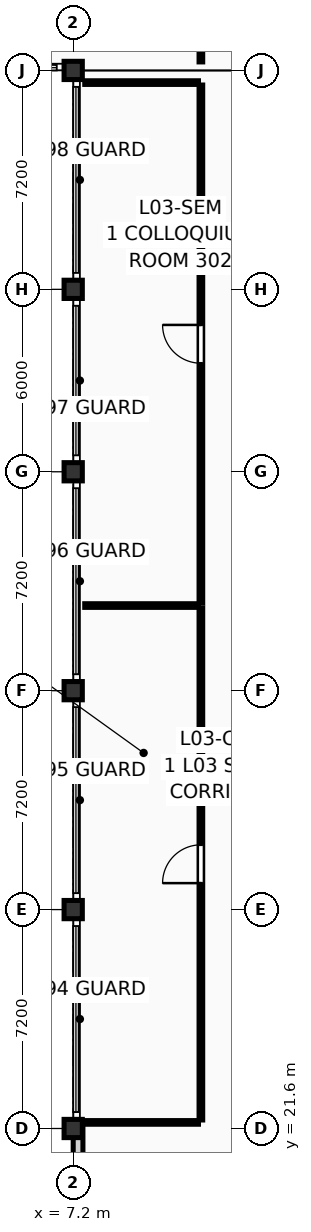
"""IFC4 building model, lengths in metres.
Left out: names, types, materials, properties, quantities, classifications, styles, units other than length and angle.
Written with IfcOpenShell. Run it as: python <this file> out.ifc"""

import sys

from ifc_helpers import new_model, si_unit, direction, frame, frame_2d, origin, origin_2d, place, context, subcontext, project, spatial, rectangle, extrude, element, fill, save


model = new_model("IFC4")
c1 = context("Model", 3, precision=1e-05, world=origin(), true_north=direction((0.0, 1.0)))
c2 = subcontext(c1, "Body", "Model", "MODEL_VIEW")
j1 = project(units=[si_unit("LENGTHUNIT", "METRE"), si_unit("PLANEANGLEUNIT", "RADIAN")], contexts=[c1])
p1 = place(None, origin())
s1 = spatial("IfcSite", under=j1, at=p1, CompositionType="ELEMENT")
p2 = place(p1, origin())
s2 = spatial("IfcBuilding", under=s1, at=p2, CompositionType="ELEMENT")
p3 = place(p2, frame((0.0, 0.0, 12.15)))
s3 = spatial("IfcBuildingStorey", under=s2, at=p3, CompositionType="ELEMENT", Elevation=12.15)
for number, where, z_axis, x_axis in (
    (1, (7.2, 21.6, 0.0), (0.0, 0.0, 1.0), (1.0, 0.0, 0.0)),
    (2, (7.2, 28.8, 0.0), (0.0, 0.0, 1.0), (1.0, 0.0, 0.0)),
    (3, (7.2, 36.0, 0.0), (0.0, 0.0, 1.0), (1.0, 0.0, 0.0)),
    (4, (7.2, 43.2, 0.0), (0.0, 0.0, 1.0), (1.0, 0.0, 0.0)),
    (5, (7.2, 49.2, 0.0), (0.0, 0.0, 1.0), (1.0, 0.0, 0.0)),
    (6, (7.2, 56.4, 0.0), (0.0, 0.0, 1.0), (1.0, 0.0, 0.0)),
):
    element("IfcColumn", number, at=place(p3, frame(where, z_axis=z_axis, x_axis=x_axis)), inside=s3, PredefinedType="COLUMN", context=c2, shape_type="SweptSolid", body=[
        extrude(rectangle(XDim=0.6, YDim=0.6, at=origin_2d()), origin(), (0.0, 0.0, 1.0), 3.6),
    ])
p4 = place(p3, frame((7.36, 14.4, 0.0), z_axis=(0.0, 0.0, 1.0), x_axis=(0.0, 1.0, 0.0)))
e7 = element("IfcWall", 7, at=p4, inside=s3, PredefinedType="SOLIDWALL", context=c2, shape_type="SweptSolid", body=[
    extrude(rectangle(XDim=7.2, YDim=0.32, at=frame_2d((3.6, 0.0))), origin(), (0.0, 0.0, 1.0), 2.84),
])
p5 = place(p4, frame((1.113, 0.0, 0.18)))
e8 = element("IfcOpeningElement", 8, at=p5, cuts=e7, PredefinedType="OPENING", context=c2, shape_type="SweptSolid", body=[
    extrude(rectangle(XDim=1.35, YDim=2.45, at=frame_2d((0.675, 1.225))), frame((0.0, 0.172, 0.0), z_axis=(0.0, -1.0, 0.0), x_axis=(1.0, 0.0, 0.0)), (0.0, 0.0, 1.0), 0.344),
])
p6 = place(p4, frame((2.925, 0.0, 0.18)))
e9 = element("IfcOpeningElement", 9, at=p6, cuts=e7, PredefinedType="OPENING", context=c2, shape_type="SweptSolid", body=[
    extrude(rectangle(XDim=1.35, YDim=2.45, at=frame_2d((0.675, 1.225))), frame((0.0, 0.172, 0.0), z_axis=(0.0, -1.0, 0.0), x_axis=(1.0, 0.0, 0.0)), (0.0, 0.0, 1.0), 0.344),
])
p7 = place(p4, frame((4.738, 0.0, 0.18)))
e10 = element("IfcOpeningElement", 10, at=p7, cuts=e7, PredefinedType="OPENING", context=c2, shape_type="SweptSolid", body=[
    extrude(rectangle(XDim=1.35, YDim=2.45, at=frame_2d((0.675, 1.225))), frame((0.0, 0.172, 0.0), z_axis=(0.0, -1.0, 0.0), x_axis=(1.0, 0.0, 0.0)), (0.0, 0.0, 1.0), 0.344),
])
p8 = place(p3, frame((7.58, 21.8, 0.0), z_axis=(0.0, 0.0, 1.0), x_axis=(1.0, 0.0, 0.0)))
e11 = element("IfcWall", 11, at=p8, inside=s3, PredefinedType="PARTITIONING", context=c2, shape_type="SweptSolid", body=[
    extrude(rectangle(XDim=3.74, YDim=0.12, at=frame_2d((1.87, 0.0))), origin(), (0.0, 0.0, 1.0), 2.691),
])
p9 = place(p3, frame((11.4, 21.88, 0.0), z_axis=(0.0, 0.0, 1.0), x_axis=(0.0, 1.0, 0.0)))
e12 = element("IfcWall", 12, at=p9, inside=s3, PredefinedType="PARTITIONING", context=c2, shape_type="SweptSolid", body=[
    extrude(rectangle(XDim=16.84, YDim=0.12, at=frame_2d((8.42, 0.0))), origin(), (0.0, 0.0, 1.0), 3.375),
])
p10 = place(p9, frame((7.79, 0.0, 0.0)))
e13 = element("IfcOpeningElement", 13, at=p10, cuts=e12, PredefinedType="OPENING", context=c2, shape_type="SweptSolid", body=[
    extrude(rectangle(XDim=1.26, YDim=2.18, at=frame_2d((0.63, 1.09))), frame((0.0, 0.072, 0.0), z_axis=(0.0, -1.0, 0.0), x_axis=(1.0, 0.0, 0.0)), (0.0, 0.0, 1.0), 0.144),
])
p11 = place(p3, frame((7.58, 38.8, 0.0), z_axis=(0.0, 0.0, 1.0), x_axis=(1.0, 0.0, 0.0)))
e14 = element("IfcWall", 14, at=p11, inside=s3, PredefinedType="PARTITIONING", context=c2, shape_type="SweptSolid", body=[
    extrude(rectangle(XDim=3.74, YDim=0.12, at=frame_2d((1.87, 0.0))), origin(), (0.0, 0.0, 1.0), 3.375),
])
p12 = place(p3, frame((11.4, 38.88, 0.0), z_axis=(0.0, 0.0, 1.0), x_axis=(0.0, 1.0, 0.0)))
e15 = element("IfcWall", 15, at=p12, inside=s3, PredefinedType="PARTITIONING", context=c2, shape_type="SweptSolid", body=[
    extrude(rectangle(XDim=17.04, YDim=0.12, at=frame_2d((8.52, 0.0))), origin(), (0.0, 0.0, 1.0), 3.375),
])
p13 = place(p12, frame((7.89, 0.0, 0.0)))
e16 = element("IfcOpeningElement", 16, at=p13, cuts=e15, PredefinedType="OPENING", context=c2, shape_type="SweptSolid", body=[
    extrude(rectangle(XDim=1.26, YDim=2.18, at=frame_2d((0.63, 1.09))), frame((0.0, 0.072, 0.0), z_axis=(0.0, -1.0, 0.0), x_axis=(1.0, 0.0, 0.0)), (0.0, 0.0, 1.0), 0.144),
])
p14 = place(p3, frame((7.58, 56.0, 0.0), z_axis=(0.0, 0.0, 1.0), x_axis=(1.0, 0.0, 0.0)))
e17 = element("IfcWall", 17, at=p14, inside=s3, PredefinedType="PARTITIONING", context=c2, shape_type="SweptSolid", body=[
    extrude(rectangle(XDim=3.74, YDim=0.12, at=frame_2d((1.87, 0.0))), origin(), (0.0, 0.0, 1.0), 3.375),
])
p15 = place(p3, frame((11.4, 56.68, 0.0), z_axis=(0.0, 0.0, 1.0), x_axis=(0.0, 1.0, 0.0)))
e18 = element("IfcWall", 18, at=p15, inside=s3, PredefinedType="PARTITIONING", context=c2, shape_type="SweptSolid", body=[
    extrude(rectangle(XDim=27.24, YDim=0.12, at=frame_2d((13.62, 0.0))), origin(), (0.0, 0.0, 1.0), 3.375),
])
p16 = place(p15, frame((12.77, 0.0, 0.0)))
e19 = element("IfcOpeningElement", 19, at=p16, cuts=e18, PredefinedType="OPENING", context=c2, shape_type="SweptSolid", body=[
    extrude(rectangle(XDim=1.7, YDim=2.28, at=frame_2d((0.85, 1.14))), frame((0.0, 0.072, 0.0), z_axis=(0.0, -1.0, 0.0), x_axis=(1.0, 0.0, 0.0)), (0.0, 0.0, 1.0), 0.144),
])
p17 = place(p10, origin())
e20 = element("IfcDoor", 20, at=p17, inside=s3, OperationType="SINGLE_SWING_LEFT", PredefinedType="DOOR", context=c2, shape_type="SweptSolid", body=[
    extrude(rectangle(XDim=1.26, YDim=2.18, at=frame_2d((0.63, 1.09))), frame((0.0, 0.025, 0.0), z_axis=(0.0, -1.0, 0.0), x_axis=(1.0, 0.0, 0.0)), (0.0, 0.0, 1.0), 0.05),
])
fill(e13, e20)
p18 = place(p13, origin())
e21 = element("IfcDoor", 21, at=p18, inside=s3, OperationType="SINGLE_SWING_RIGHT", PredefinedType="DOOR", context=c2, shape_type="SweptSolid", body=[
    extrude(rectangle(XDim=1.26, YDim=2.18, at=frame_2d((0.63, 1.09))), frame((0.0, 0.025, 0.0), z_axis=(0.0, -1.0, 0.0), x_axis=(1.0, 0.0, 0.0)), (0.0, 0.0, 1.0), 0.05),
])
fill(e16, e21)
save(model, sys.argv[1])
